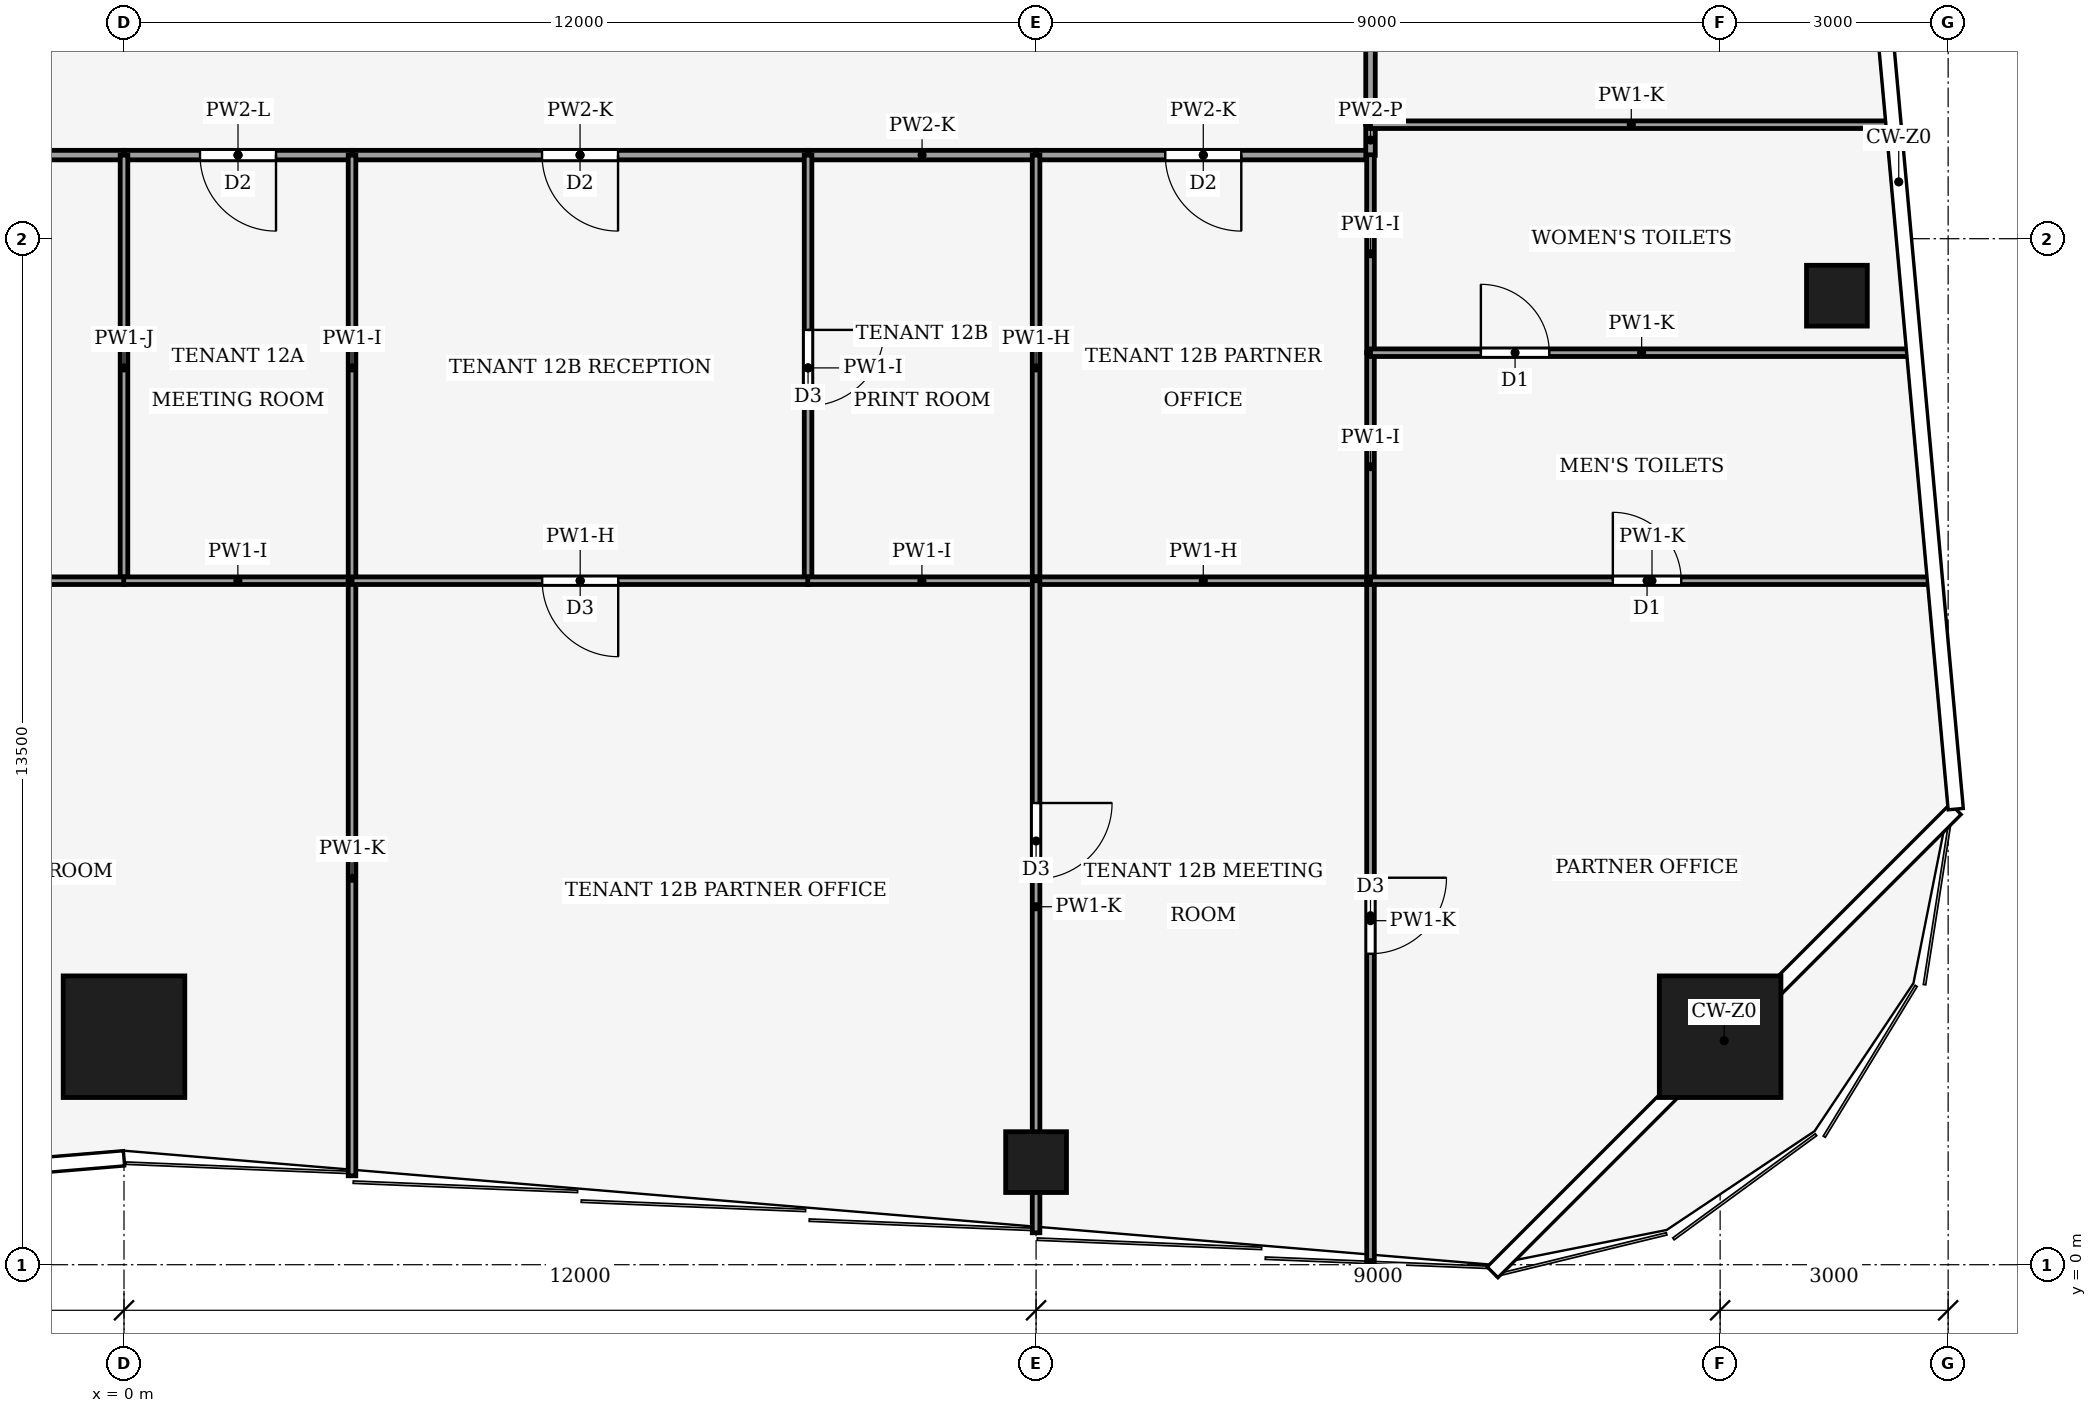
"""IFC4 building model, lengths in metres.
Left out: names, types, materials, properties, quantities, classifications, styles, units other than length and angle.
Written with IfcOpenShell. Run it as: python <this file> out.ifc"""

import sys

from ifc_helpers import new_model, si_unit, direction, frame, frame_2d, origin, origin_2d, place, context, subcontext, project, spatial, rectangle, hollow_rectangle, extrude, element, fill, save


model = new_model("IFC4")
c1 = context("Model", 3, precision=1e-05, world=origin(), true_north=direction((0.0, 1.0)))
c2 = subcontext(c1, "Body", "Model", "MODEL_VIEW")
j1 = project(units=[si_unit("LENGTHUNIT", "METRE"), si_unit("PLANEANGLEUNIT", "RADIAN")], contexts=[c1])
p1 = place(None, origin())
s1 = spatial("IfcSite", under=j1, at=p1, CompositionType="ELEMENT")
p2 = place(p1, origin())
s2 = spatial("IfcBuilding", under=s1, at=p2, CompositionType="ELEMENT")
p3 = place(p2, frame((0.0, 0.0, 54.0)))
s3 = spatial("IfcBuildingStorey", under=s2, at=p3, CompositionType="ELEMENT", Elevation=54.0)
for number, where, z_axis, x_axis in (
    (1, (21.0, 3.0, 0.0), (0.0, 0.0, 1.0), (1.0, 0.0, 0.0)),
    (2, (0.0, 3.0, 0.0), (0.0, 0.0, 1.0), (1.0, 0.0, 0.0)),
):
    element("IfcColumn", number, at=place(p3, frame(where, z_axis=z_axis, x_axis=x_axis)), inside=s3, PredefinedType="COLUMN", context=c2, shape_type="SweptSolid", body=[
        extrude(hollow_rectangle(XDim=1.6, YDim=1.6, WallThickness=0.09, at=origin_2d()), origin(), (0.0, 0.0, 1.0), 4.0),
    ])
for number, where, z_axis, x_axis in (
    (3, (12.0, 1.35, 0.0), (0.0, 0.0, 1.0), (1.0, 0.0, 0.0)),
    (4, (22.536, 12.75, 0.0), (0.0, 0.0, 1.0), (1.0, 0.0, 0.0)),
):
    element("IfcColumn", number, at=place(p3, frame(where, z_axis=z_axis, x_axis=x_axis)), inside=s3, PredefinedType="COLUMN", context=c2, shape_type="SweptSolid", body=[
        extrude(hollow_rectangle(XDim=0.8, YDim=0.8, WallThickness=0.04, at=origin_2d()), origin(), (0.0, 0.0, 1.0), 4.0),
    ])
p4 = place(p3, frame((0.0, 14.6, 0.0), z_axis=(0.0, 0.0, 1.0), x_axis=(-1.0, 0.0, 0.0)))
e5 = element("IfcWall", 5, at=p4, inside=s3, PredefinedType="PARTITIONING", context=c2, shape_type="SweptSolid", body=[
    extrude(rectangle(XDim=9.0, YDim=0.125, at=frame_2d((4.5, 0.0))), origin(), (0.0, 0.0, 1.0), 3.17),
])
p5 = place(p4, frame((4.0, 0.0, 0.0)))
e6 = element("IfcOpeningElement", 6, at=p5, cuts=e5, PredefinedType="OPENING", context=c2, shape_type="SweptSolid", body=[
    extrude(rectangle(XDim=1.0, YDim=2.1, at=frame_2d((0.5, 1.05))), frame((0.0, 0.073, 0.0), z_axis=(0.0, -1.0, 0.0), x_axis=(1.0, 0.0, 0.0)), (0.0, 0.0, 1.0), 0.145),
])
p6 = place(p3, frame((3.0, 14.6, 0.0), z_axis=(0.0, 0.0, 1.0), x_axis=(-1.0, 0.0, 0.0)))
e7 = element("IfcWall", 7, at=p6, inside=s3, PredefinedType="PARTITIONING", context=c2, shape_type="SweptSolid", body=[
    extrude(rectangle(XDim=3.0, YDim=0.125, at=frame_2d((1.5, 0.0))), origin(), (0.0, 0.0, 1.0), 3.22),
])
p7 = place(p6, frame((1.0, 0.0, 0.0)))
e8 = element("IfcOpeningElement", 8, at=p7, cuts=e7, PredefinedType="OPENING", context=c2, shape_type="SweptSolid", body=[
    extrude(rectangle(XDim=1.0, YDim=2.1, at=frame_2d((0.5, 1.05))), frame((0.0, 0.073, 0.0), z_axis=(0.0, -1.0, 0.0), x_axis=(1.0, 0.0, 0.0)), (0.0, 0.0, 1.0), 0.145),
])
p8 = place(p3, frame((9.0, 14.6, 0.0), z_axis=(0.0, 0.0, 1.0), x_axis=(-1.0, 0.0, 0.0)))
e9 = element("IfcWall", 9, at=p8, inside=s3, PredefinedType="PARTITIONING", context=c2, shape_type="SweptSolid", body=[
    extrude(rectangle(XDim=6.0, YDim=0.125, at=frame_2d((3.0, 0.0))), origin(), (0.0, 0.0, 1.0), 3.17),
])
p9 = place(p8, frame((2.5, 0.0, 0.0)))
e10 = element("IfcOpeningElement", 10, at=p9, cuts=e9, PredefinedType="OPENING", context=c2, shape_type="SweptSolid", body=[
    extrude(rectangle(XDim=1.0, YDim=2.1, at=frame_2d((0.5, 1.05))), frame((0.0, 0.073, 0.0), z_axis=(0.0, -1.0, 0.0), x_axis=(1.0, 0.0, 0.0)), (0.0, 0.0, 1.0), 0.145),
])
p10 = place(p3, frame((9.0, 14.6, 0.0), z_axis=(0.0, 0.0, 1.0), x_axis=(1.0, 0.0, 0.0)))
e11 = element("IfcWall", 11, at=p10, inside=s3, PredefinedType="PARTITIONING", context=c2, shape_type="SweptSolid", body=[
    extrude(rectangle(XDim=3.0, YDim=0.125, at=frame_2d((1.5, 0.0))), origin(), (0.0, 0.0, 1.0), 3.17),
])
p11 = place(p3, frame((16.4, 14.6, 0.0), z_axis=(0.0, 0.0, 1.0), x_axis=(-1.0, 0.0, 0.0)))
e12 = element("IfcWall", 12, at=p11, inside=s3, PredefinedType="PARTITIONING", context=c2, shape_type="SweptSolid", body=[
    extrude(rectangle(XDim=4.4, YDim=0.125, at=frame_2d((2.2, 0.0))), origin(), (0.0, 0.0, 1.0), 3.17),
])
p12 = place(p11, frame((1.7, 0.0, 0.0)))
e13 = element("IfcOpeningElement", 13, at=p12, cuts=e12, PredefinedType="OPENING", context=c2, shape_type="SweptSolid", body=[
    extrude(rectangle(XDim=1.0, YDim=2.1, at=frame_2d((0.5, 1.05))), frame((0.0, 0.073, 0.0), z_axis=(0.0, -1.0, 0.0), x_axis=(1.0, 0.0, 0.0)), (0.0, 0.0, 1.0), 0.145),
])
p13 = place(p3, frame((16.4, 14.596, 0.0), z_axis=(0.0, 0.0, 1.0), x_axis=(0.0, 1.0, 0.0)))
e14 = element("IfcWall", 14, at=p13, inside=s3, PredefinedType="PARTITIONING", context=c2, shape_type="SweptSolid", body=[
    extrude(rectangle(XDim=0.404, YDim=0.125, at=frame_2d((0.202, 0.0))), origin(), (0.0, 0.0, 1.0), 3.75),
])
p14 = place(p3, frame((16.4, 18.0, 0.0), z_axis=(0.0, 0.0, 1.0), x_axis=(0.0, -1.0, 0.0)))
e15 = element("IfcWall", 15, at=p14, inside=s3, PredefinedType="PARTITIONING", context=c2, shape_type="SweptSolid", body=[
    extrude(rectangle(XDim=3.0, YDim=0.125, at=frame_2d((1.5, 0.0))), origin(), (0.0, 0.0, 1.0), 3.02),
])
p15 = place(p14, frame((0.65, 0.0, 0.0)))
e16 = element("IfcOpeningElement", 16, at=p15, cuts=e15, PredefinedType="OPENING", context=c2, shape_type="SweptSolid", body=[
    extrude(rectangle(XDim=0.9, YDim=2.1, at=frame_2d((0.45, 1.05))), frame((0.0, 0.073, 0.0), z_axis=(0.0, -1.0, 0.0), x_axis=(1.0, 0.0, 0.0)), (0.0, 0.0, 1.0), 0.145),
])
p16 = place(p3, frame((0.0, 9.0, 0.0), z_axis=(0.0, 0.0, 1.0), x_axis=(0.0, 1.0, 0.0)))
e17 = element("IfcWall", 17, at=p16, inside=s3, PredefinedType="PARTITIONING", context=c2, shape_type="SweptSolid", body=[
    extrude(rectangle(XDim=5.6, YDim=0.1, at=frame_2d((2.8, 0.0))), origin(), (0.0, 0.0, 1.0), 3.22),
])
p17 = place(p3, frame((0.004, 9.0, 0.0), z_axis=(0.0, 0.0, 1.0), x_axis=(-1.0, 0.0, 0.0)))
e18 = element("IfcWall", 18, at=p17, inside=s3, PredefinedType="PARTITIONING", context=c2, shape_type="SweptSolid", body=[
    extrude(rectangle(XDim=6.004, YDim=0.1, at=frame_2d((3.002, 0.0))), origin(), (0.0, 0.0, 1.0), 3.17),
])
p18 = place(p17, frame((2.502, 0.0, 0.0)))
e19 = element("IfcOpeningElement", 19, at=p18, cuts=e18, PredefinedType="OPENING", context=c2, shape_type="SweptSolid", body=[
    extrude(rectangle(XDim=1.0, YDim=2.1, at=frame_2d((0.5, 1.05))), frame((0.0, 0.06, 0.0), z_axis=(0.0, -1.0, 0.0), x_axis=(1.0, 0.0, 0.0)), (0.0, 0.0, 1.0), 0.12),
])
p19 = place(p3, frame((-0.004, 9.0, 0.0), z_axis=(0.0, 0.0, 1.0), x_axis=(1.0, 0.0, 0.0)))
e20 = element("IfcWall", 20, at=p19, inside=s3, PredefinedType="PARTITIONING", context=c2, shape_type="SweptSolid", body=[
    extrude(rectangle(XDim=3.004, YDim=0.1, at=frame_2d((1.502, 0.0))), origin(), (0.0, 0.0, 1.0), 3.75),
])
p20 = place(p3, frame((3.0, 9.0, 0.0), z_axis=(0.0, 0.0, 1.0), x_axis=(0.0, 1.0, 0.0)))
e21 = element("IfcWall", 21, at=p20, inside=s3, PredefinedType="PARTITIONING", context=c2, shape_type="SweptSolid", body=[
    extrude(rectangle(XDim=5.6, YDim=0.1, at=frame_2d((2.8, 0.0))), origin(), (0.0, 0.0, 1.0), 3.75),
])
p21 = place(p3, frame((3.0, 1.17, 0.0), z_axis=(0.0, 0.0, 1.0), x_axis=(0.0, 1.0, 0.0)))
e22 = element("IfcWall", 22, at=p21, inside=s3, PredefinedType="PARTITIONING", context=c2, shape_type="SweptSolid", body=[
    extrude(rectangle(XDim=7.83, YDim=0.1, at=frame_2d((3.915, 0.0))), origin(), (0.0, 0.0, 1.0), 2.92),
])
p22 = place(p3, frame((9.0, 14.6, 0.0), z_axis=(0.0, 0.0, 1.0), x_axis=(0.0, -1.0, 0.0)))
e23 = element("IfcWall", 23, at=p22, inside=s3, PredefinedType="PARTITIONING", context=c2, shape_type="SweptSolid", body=[
    extrude(rectangle(XDim=5.6, YDim=0.1, at=frame_2d((2.8, 0.0))), origin(), (0.0, 0.0, 1.0), 3.75),
])
p23 = place(p22, frame((2.3, 0.0, 0.0)))
e24 = element("IfcOpeningElement", 24, at=p23, cuts=e23, PredefinedType="OPENING", context=c2, shape_type="SweptSolid", body=[
    extrude(rectangle(XDim=1.0, YDim=2.1, at=frame_2d((0.5, 1.05))), frame((0.0, 0.06, 0.0), z_axis=(0.0, -1.0, 0.0), x_axis=(1.0, 0.0, 0.0)), (0.0, 0.0, 1.0), 0.12),
])
p24 = place(p3, frame((9.004, 9.0, 0.0), z_axis=(0.0, 0.0, 1.0), x_axis=(-1.0, 0.0, 0.0)))
e25 = element("IfcWall", 25, at=p24, inside=s3, PredefinedType="PARTITIONING", context=c2, shape_type="SweptSolid", body=[
    extrude(rectangle(XDim=6.004, YDim=0.1, at=frame_2d((3.002, 0.0))), origin(), (0.0, 0.0, 1.0), 3.17),
])
p25 = place(p24, frame((2.502, 0.0, 0.0)))
e26 = element("IfcOpeningElement", 26, at=p25, cuts=e25, PredefinedType="OPENING", context=c2, shape_type="SweptSolid", body=[
    extrude(rectangle(XDim=1.0, YDim=2.1, at=frame_2d((0.5, 1.05))), frame((0.0, 0.06, 0.0), z_axis=(0.0, -1.0, 0.0), x_axis=(1.0, 0.0, 0.0)), (0.0, 0.0, 1.0), 0.12),
])
p26 = place(p3, frame((12.0, 9.0, 0.0), z_axis=(0.0, 0.0, 1.0), x_axis=(0.0, 1.0, 0.0)))
e27 = element("IfcWall", 27, at=p26, inside=s3, PredefinedType="PARTITIONING", context=c2, shape_type="SweptSolid", body=[
    extrude(rectangle(XDim=5.6, YDim=0.1, at=frame_2d((2.8, 0.0))), origin(), (0.0, 0.0, 1.0), 3.17),
])
p27 = place(p3, frame((8.996, 9.0, 0.0), z_axis=(0.0, 0.0, 1.0), x_axis=(1.0, 0.0, 0.0)))
e28 = element("IfcWall", 28, at=p27, inside=s3, PredefinedType="PARTITIONING", context=c2, shape_type="SweptSolid", body=[
    extrude(rectangle(XDim=3.004, YDim=0.1, at=frame_2d((1.502, 0.0))), origin(), (0.0, 0.0, 1.0), 3.75),
])
p28 = place(p3, frame((12.0, 9.0, 0.0), z_axis=(0.0, 0.0, 1.0), x_axis=(1.0, 0.0, 0.0)))
e29 = element("IfcWall", 29, at=p28, inside=s3, PredefinedType="PARTITIONING", context=c2, shape_type="SweptSolid", body=[
    extrude(rectangle(XDim=4.4, YDim=0.1, at=frame_2d((2.2, 0.0))), origin(), (0.0, 0.0, 1.0), 3.17),
])
p29 = place(p3, frame((16.4, 9.0, 0.0), z_axis=(0.0, 0.0, 1.0), x_axis=(0.0, 1.0, 0.0)))
e30 = element("IfcWall", 30, at=p29, inside=s3, PredefinedType="PARTITIONING", context=c2, shape_type="SweptSolid", body=[
    extrude(rectangle(XDim=3.0, YDim=0.1, at=frame_2d((1.5, 0.0))), origin(), (0.0, 0.0, 1.0), 3.75),
])
p30 = place(p3, frame((16.4, 12.0, 0.0), z_axis=(0.0, 0.0, 1.0), x_axis=(0.0, 1.0, 0.0)))
e31 = element("IfcWall", 31, at=p30, inside=s3, PredefinedType="PARTITIONING", context=c2, shape_type="SweptSolid", body=[
    extrude(rectangle(XDim=2.604, YDim=0.1, at=frame_2d((1.302, 0.0))), origin(), (0.0, 0.0, 1.0), 3.75),
])
p31 = place(p3, frame((12.0, 9.0, 0.0), z_axis=(0.0, 0.0, 1.0), x_axis=(0.0, -1.0, 0.0)))
e32 = element("IfcWall", 32, at=p31, inside=s3, PredefinedType="PARTITIONING", context=c2, shape_type="SweptSolid", body=[
    extrude(rectangle(XDim=8.58, YDim=0.1, at=frame_2d((4.29, 0.0))), origin(), (0.0, 0.0, 1.0), 2.92),
])
p32 = place(p31, frame((2.925, 0.0, 0.0)))
e33 = element("IfcOpeningElement", 33, at=p32, cuts=e32, PredefinedType="OPENING", context=c2, shape_type="SweptSolid", body=[
    extrude(rectangle(XDim=1.0, YDim=2.1, at=frame_2d((0.5, 1.05))), frame((0.0, 0.06, 0.0), z_axis=(0.0, -1.0, 0.0), x_axis=(1.0, 0.0, 0.0)), (0.0, 0.0, 1.0), 0.12),
])
p33 = place(p3, frame((16.4, 9.0, 0.0), z_axis=(0.0, 0.0, 1.0), x_axis=(0.0, -1.0, 0.0)))
e34 = element("IfcWall", 34, at=p33, inside=s3, PredefinedType="PARTITIONING", context=c2, shape_type="SweptSolid", body=[
    extrude(rectangle(XDim=8.947, YDim=0.1, at=frame_2d((4.473, 0.0))), origin(), (0.0, 0.0, 1.0), 2.92),
])
p34 = place(p33, frame((3.908, 0.0, 0.0)))
e35 = element("IfcOpeningElement", 35, at=p34, cuts=e34, PredefinedType="OPENING", context=c2, shape_type="SweptSolid", body=[
    extrude(rectangle(XDim=1.0, YDim=2.1, at=frame_2d((0.5, 1.05))), frame((0.0, 0.06, 0.0), z_axis=(0.0, -1.0, 0.0), x_axis=(1.0, 0.0, 0.0)), (0.0, 0.0, 1.0), 0.12),
])
p35 = place(p3, frame((16.4, 9.0, 0.0), z_axis=(0.0, 0.0, 1.0), x_axis=(1.0, 0.0, 0.0)))
e36 = element("IfcWall", 36, at=p35, inside=s3, PredefinedType="PARTITIONING", context=c2, shape_type="SweptSolid", body=[
    extrude(rectangle(XDim=7.407, YDim=0.1, at=frame_2d((3.704, 0.0))), origin(), (0.0, 0.0, 1.0), 2.92),
])
p36 = place(p35, frame((3.188, 0.0, 0.0)))
e37 = element("IfcOpeningElement", 37, at=p36, cuts=e36, PredefinedType="OPENING", context=c2, shape_type="SweptSolid", body=[
    extrude(rectangle(XDim=0.9, YDim=2.1, at=frame_2d((0.45, 1.05))), frame((0.0, 0.06, 0.0), z_axis=(0.0, -1.0, 0.0), x_axis=(1.0, 0.0, 0.0)), (0.0, 0.0, 1.0), 0.12),
])
p37 = place(p3, frame((16.4, 12.0, 0.0), z_axis=(0.0, 0.0, 1.0), x_axis=(1.0, 0.0, 0.0)))
e38 = element("IfcWall", 38, at=p37, inside=s3, PredefinedType="PARTITIONING", context=c2, shape_type="SweptSolid", body=[
    extrude(rectangle(XDim=7.135, YDim=0.1, at=frame_2d((3.567, 0.0))), origin(), (0.0, 0.0, 1.0), 2.92),
])
p38 = place(p37, frame((1.452, 0.0, 0.0)))
e39 = element("IfcOpeningElement", 39, at=p38, cuts=e38, PredefinedType="OPENING", context=c2, shape_type="SweptSolid", body=[
    extrude(rectangle(XDim=0.9, YDim=2.1, at=frame_2d((0.45, 1.05))), frame((0.0, 0.06, 0.0), z_axis=(0.0, -1.0, 0.0), x_axis=(1.0, 0.0, 0.0)), (0.0, 0.0, 1.0), 0.12),
])
p39 = place(p3, frame((23.262, 15.0, 0.0), z_axis=(0.0, 0.0, 1.0), x_axis=(-1.0, 0.0, 0.0)))
e40 = element("IfcWall", 40, at=p39, inside=s3, PredefinedType="PARTITIONING", context=c2, shape_type="SweptSolid", body=[
    extrude(rectangle(XDim=6.862, YDim=0.1, at=frame_2d((3.431, 0.0))), origin(), (0.0, 0.0, 1.0), 2.92),
])
p40 = place(p7, origin())
e41 = element("IfcDoor", 41, at=p40, inside=s3, OperationType="SINGLE_SWING_LEFT", PredefinedType="DOOR", context=c2, shape_type="SweptSolid", body=[
    extrude(rectangle(XDim=1.0, YDim=2.1, at=frame_2d((0.5, 1.05))), frame((0.0, 0.025, 0.0), z_axis=(0.0, -1.0, 0.0), x_axis=(1.0, 0.0, 0.0)), (0.0, 0.0, 1.0), 0.05),
])
fill(e8, e41)
p41 = place(p9, origin())
e42 = element("IfcDoor", 42, at=p41, inside=s3, OperationType="SINGLE_SWING_RIGHT", PredefinedType="DOOR", context=c2, shape_type="SweptSolid", body=[
    extrude(rectangle(XDim=1.0, YDim=2.1, at=frame_2d((0.5, 1.05))), frame((0.0, 0.025, 0.0), z_axis=(0.0, -1.0, 0.0), x_axis=(1.0, 0.0, 0.0)), (0.0, 0.0, 1.0), 0.05),
])
fill(e10, e42)
p42 = place(p12, origin())
e43 = element("IfcDoor", 43, at=p42, inside=s3, OperationType="SINGLE_SWING_LEFT", PredefinedType="DOOR", context=c2, shape_type="SweptSolid", body=[
    extrude(rectangle(XDim=1.0, YDim=2.1, at=frame_2d((0.5, 1.05))), frame((0.0, 0.025, 0.0), z_axis=(0.0, -1.0, 0.0), x_axis=(1.0, 0.0, 0.0)), (0.0, 0.0, 1.0), 0.05),
])
fill(e13, e43)
p43 = place(p23, origin())
e44 = element("IfcDoor", 44, at=p43, inside=s3, OperationType="SINGLE_SWING_RIGHT", PredefinedType="DOOR", context=c2, shape_type="SweptSolid", body=[
    extrude(rectangle(XDim=1.0, YDim=2.1, at=frame_2d((0.5, 1.05))), frame((0.0, 0.025, 0.0), z_axis=(0.0, -1.0, 0.0), x_axis=(1.0, 0.0, 0.0)), (0.0, 0.0, 1.0), 0.05),
])
fill(e24, e44)
p44 = place(p25, origin())
e45 = element("IfcDoor", 45, at=p44, inside=s3, OperationType="SINGLE_SWING_LEFT", PredefinedType="DOOR", context=c2, shape_type="SweptSolid", body=[
    extrude(rectangle(XDim=1.0, YDim=2.1, at=frame_2d((0.5, 1.05))), frame((0.0, 0.025, 0.0), z_axis=(0.0, -1.0, 0.0), x_axis=(1.0, 0.0, 0.0)), (0.0, 0.0, 1.0), 0.05),
])
fill(e26, e45)
p45 = place(p32, origin())
e46 = element("IfcDoor", 46, at=p45, inside=s3, OperationType="SINGLE_SWING_LEFT", PredefinedType="DOOR", context=c2, shape_type="SweptSolid", body=[
    extrude(rectangle(XDim=1.0, YDim=2.1, at=frame_2d((0.5, 1.05))), frame((0.0, 0.025, 0.0), z_axis=(0.0, -1.0, 0.0), x_axis=(1.0, 0.0, 0.0)), (0.0, 0.0, 1.0), 0.05),
])
fill(e33, e46)
p46 = place(p34, origin())
e47 = element("IfcDoor", 47, at=p46, inside=s3, OperationType="SINGLE_SWING_LEFT", PredefinedType="DOOR", context=c2, shape_type="SweptSolid", body=[
    extrude(rectangle(XDim=1.0, YDim=2.1, at=frame_2d((0.5, 1.05))), frame((0.0, 0.025, 0.0), z_axis=(0.0, -1.0, 0.0), x_axis=(1.0, 0.0, 0.0)), (0.0, 0.0, 1.0), 0.05),
])
fill(e35, e47)
p47 = place(p36, origin())
e48 = element("IfcDoor", 48, at=p47, inside=s3, OperationType="SINGLE_SWING_LEFT", PredefinedType="DOOR", context=c2, shape_type="SweptSolid", body=[
    extrude(rectangle(XDim=0.9, YDim=2.1, at=frame_2d((0.45, 1.05))), frame((0.0, 0.025, 0.0), z_axis=(0.0, -1.0, 0.0), x_axis=(1.0, 0.0, 0.0)), (0.0, 0.0, 1.0), 0.05),
])
fill(e37, e48)
p48 = place(p38, origin())
e49 = element("IfcDoor", 49, at=p48, inside=s3, OperationType="SINGLE_SWING_LEFT", PredefinedType="DOOR", context=c2, shape_type="SweptSolid", body=[
    extrude(rectangle(XDim=0.9, YDim=2.1, at=frame_2d((0.45, 1.05))), frame((0.0, 0.025, 0.0), z_axis=(0.0, -1.0, 0.0), x_axis=(1.0, 0.0, 0.0)), (0.0, 0.0, 1.0), 0.05),
])
fill(e39, e49)
save(model, sys.argv[1])
